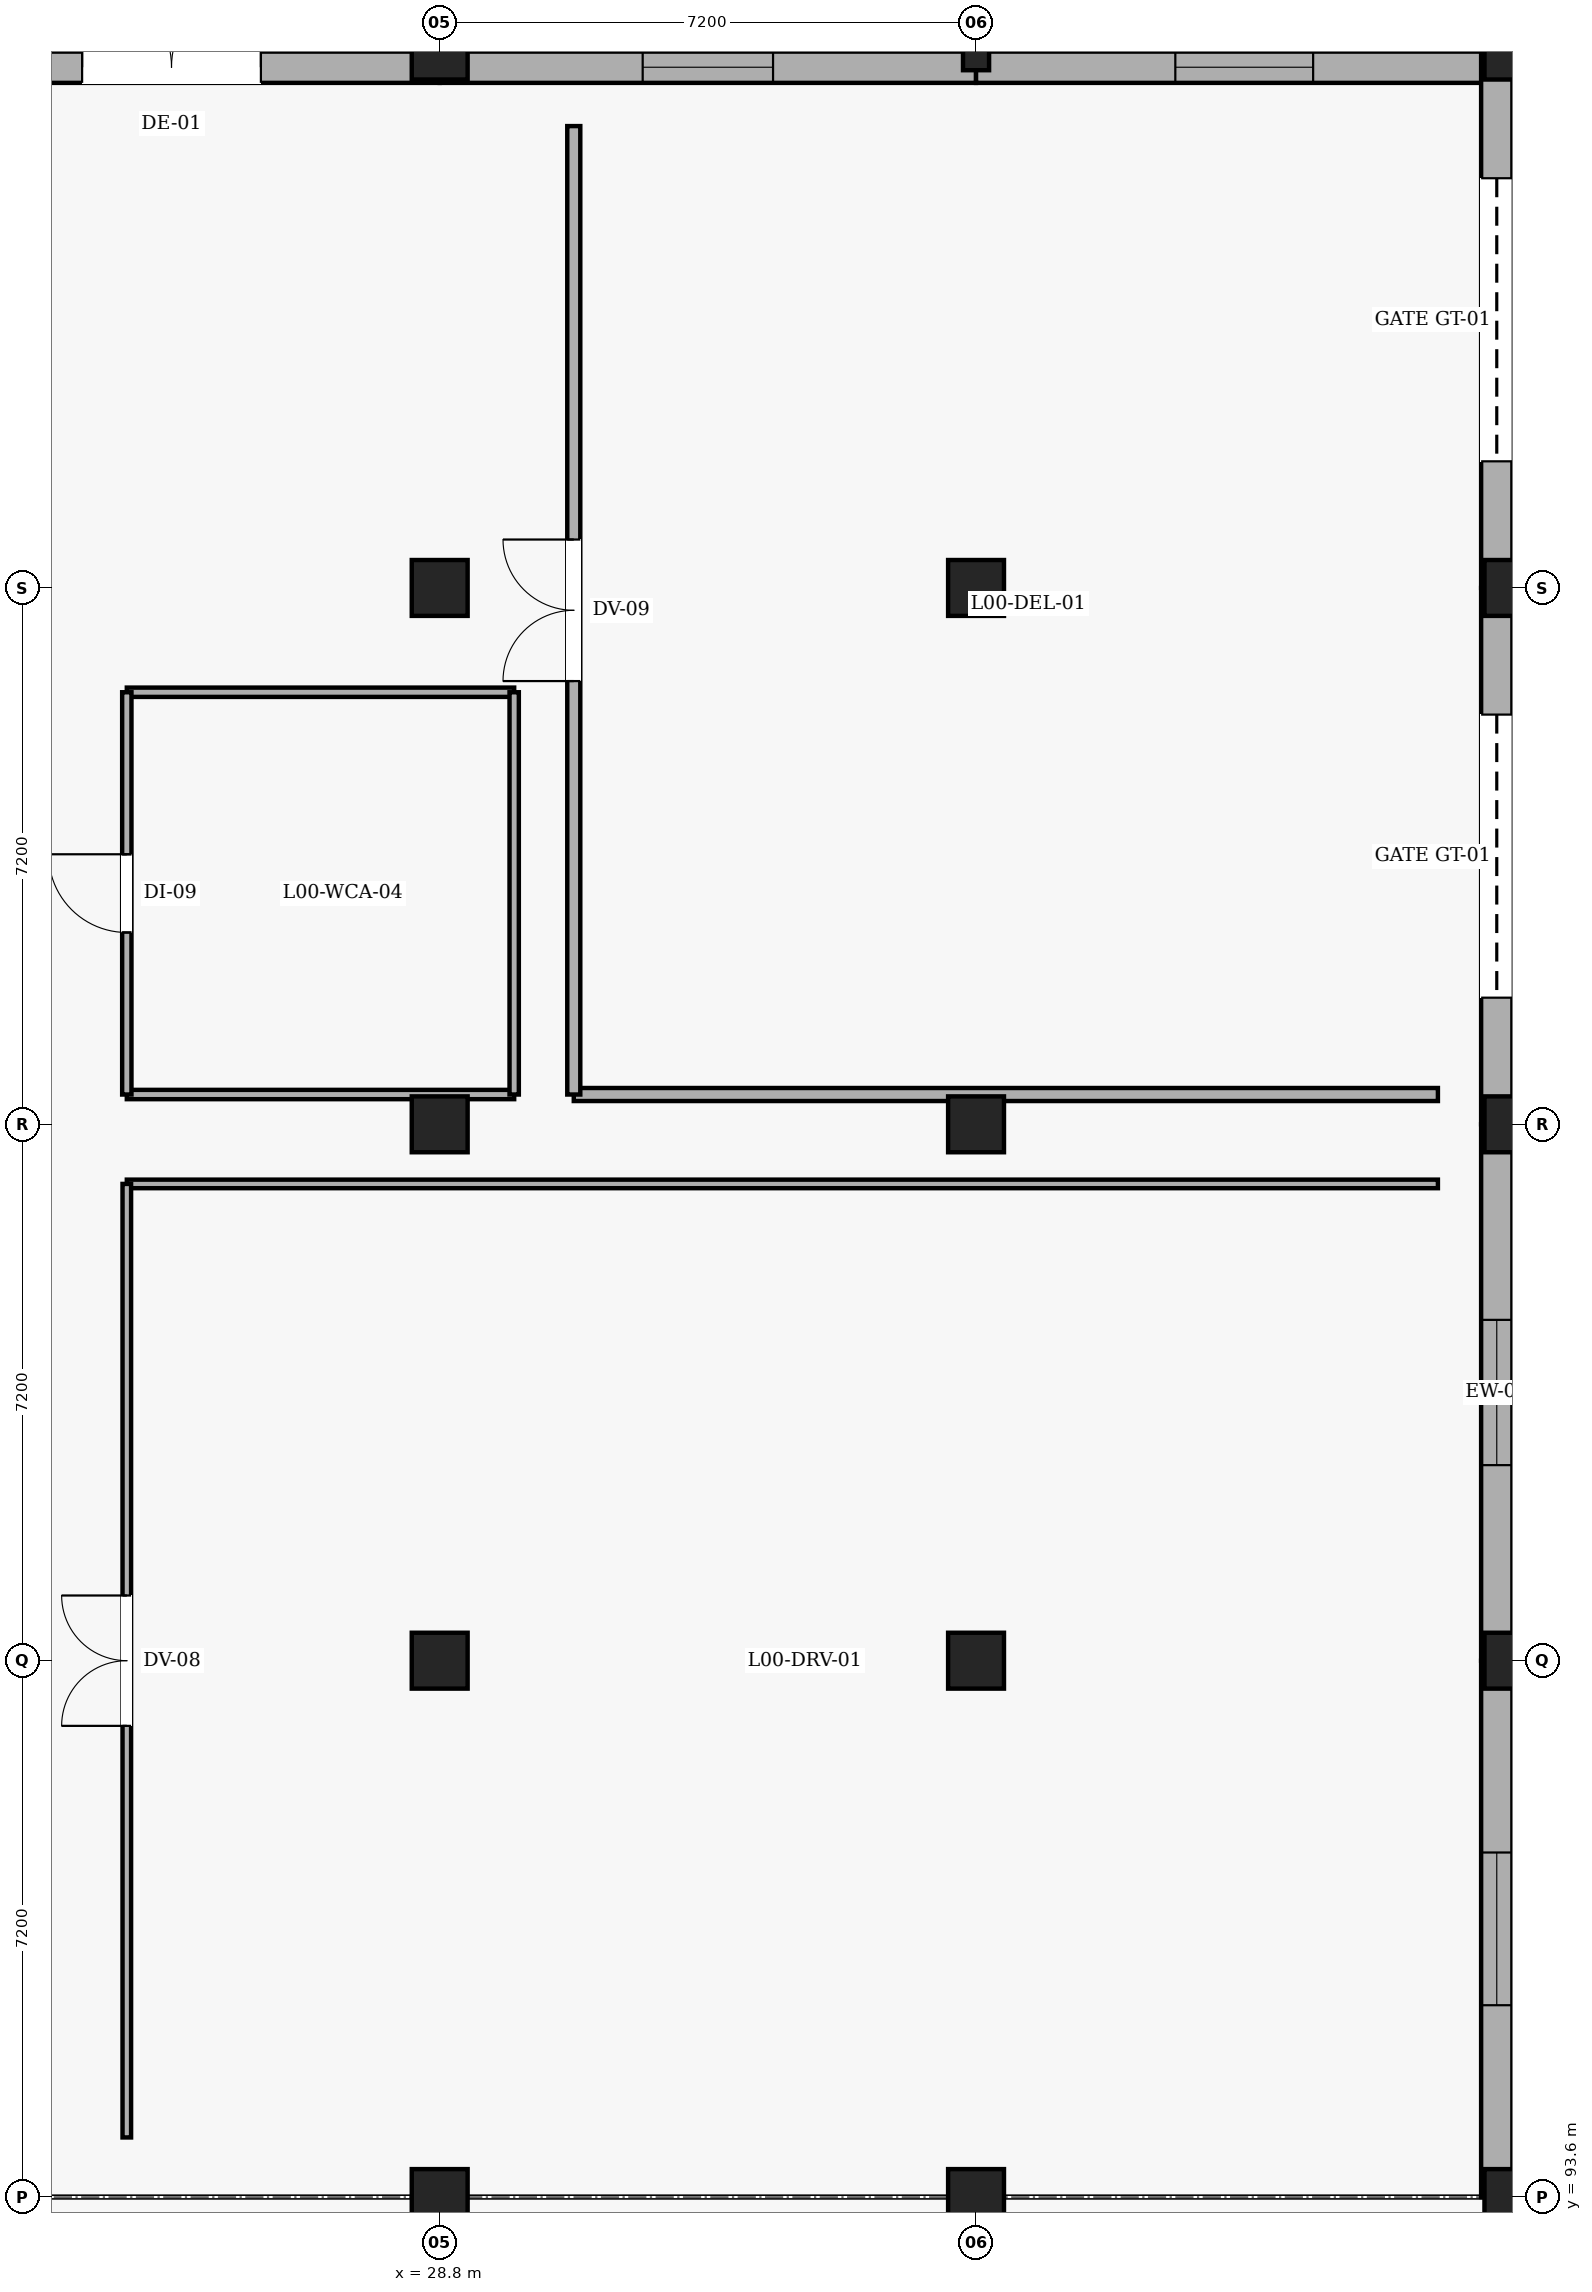
"""IFC4 building model, lengths in metres.
Left out: names, types, materials, properties, quantities, classifications, styles, units other than length and angle.
Written with IfcOpenShell. Run it as: python <this file> out.ifc"""

import sys

from ifc_helpers import new_model, si_unit, direction, frame, frame_2d, origin, origin_2d, place, context, subcontext, project, spatial, rectangle, extrude, element, fill, save


model = new_model("IFC4")
c1 = context("Model", 3, precision=1e-05, world=origin(), true_north=direction((0.0, 1.0)))
c2 = subcontext(c1, "Body", "Model", "MODEL_VIEW")
j1 = project(units=[si_unit("LENGTHUNIT", "METRE"), si_unit("PLANEANGLEUNIT", "RADIAN")], contexts=[c1])
p1 = place(None, origin())
s1 = spatial("IfcSite", under=j1, at=p1, CompositionType="ELEMENT")
p2 = place(p1, origin())
s2 = spatial("IfcBuilding", under=s1, at=p2, CompositionType="ELEMENT")
p3 = place(p2, origin())
s3 = spatial("IfcBuildingStorey", under=s2, at=p3, CompositionType="ELEMENT", Elevation=0.0)
for number, where, z_axis, x_axis in (
    (1, (28.8, 93.6, 0.0), (0.0, 0.0, 1.0), (1.0, 0.0, 0.0)),
    (2, (28.8, 100.8, 0.0), (0.0, 0.0, 1.0), (1.0, 0.0, 0.0)),
    (3, (28.8, 108.0, 0.0), (0.0, 0.0, 1.0), (1.0, 0.0, 0.0)),
    (4, (28.8, 115.2, 0.0), (0.0, 0.0, 1.0), (1.0, 0.0, 0.0)),
    (5, (28.8, 122.4, 0.0), (0.0, 0.0, 1.0), (1.0, 0.0, 0.0)),
    (6, (36.0, 93.6, 0.0), (0.0, 0.0, 1.0), (1.0, 0.0, 0.0)),
    (7, (36.0, 100.8, 0.0), (0.0, 0.0, 1.0), (1.0, 0.0, 0.0)),
    (8, (36.0, 108.0, 0.0), (0.0, 0.0, 1.0), (1.0, 0.0, 0.0)),
    (9, (36.0, 115.2, 0.0), (0.0, 0.0, 1.0), (1.0, 0.0, 0.0)),
):
    element("IfcColumn", number, at=place(p3, frame(where, z_axis=z_axis, x_axis=x_axis)), inside=s3, PredefinedType="COLUMN", context=c2, shape_type="SweptSolid", body=[
        extrude(rectangle(XDim=0.75, YDim=0.75, at=origin_2d()), origin(), (0.0, 0.0, 1.0), 5.08),
    ])
p4 = place(p3, frame((36.0, 122.4, 0.0), z_axis=(0.0, 0.0, 1.0), x_axis=(1.0, 0.0, 0.0)))
e10 = element("IfcColumn", 10, at=p4, inside=s3, PredefinedType="PILASTER", context=c2, shape_type="SweptSolid", body=[
    extrude(rectangle(XDim=0.35, YDim=0.5, at=origin_2d()), origin(), (0.0, 0.0, 1.0), 5.08),
])
for number, where, z_axis, x_axis in (
    (11, (43.2, 93.6, 0.0), (0.0, 0.0, 1.0), (0.0, 1.0, 0.0)),
    (12, (43.2, 100.8, 0.0), (0.0, 0.0, 1.0), (1.0, 0.0, 0.0)),
    (13, (43.2, 108.0, 0.0), (0.0, 0.0, 1.0), (1.0, 0.0, 0.0)),
    (14, (43.2, 115.2, 0.0), (0.0, 0.0, 1.0), (1.0, 0.0, 0.0)),
    (15, (43.2, 122.4, 0.0), (0.0, 0.0, 1.0), (1.0, 0.0, 0.0)),
):
    element("IfcColumn", number, at=place(p3, frame(where, z_axis=z_axis, x_axis=x_axis)), inside=s3, PredefinedType="COLUMN", context=c2, shape_type="SweptSolid", body=[
        extrude(rectangle(XDim=0.75, YDim=0.75, at=origin_2d()), origin(), (0.0, 0.0, 1.0), 5.08),
    ])
p5 = place(p3, frame((21.6, 122.19, 0.0), z_axis=(0.0, 0.0, 1.0), x_axis=(1.0, 0.0, 0.0)))
e16 = element("IfcWall", 16, at=p5, inside=s3, PredefinedType="SOLIDWALL", context=c2, shape_type="SweptSolid", body=[
    extrude(rectangle(XDim=7.2, YDim=0.42, at=frame_2d((3.6, 0.0))), origin(), (0.0, 0.0, 1.0), 4.78),
])
p6 = place(p5, frame((2.4, 0.0, 0.0)))
e17 = element("IfcOpeningElement", 17, at=p6, cuts=e16, PredefinedType="OPENING", context=c2, shape_type="SweptSolid", body=[
    extrude(rectangle(XDim=2.4, YDim=2.5, at=frame_2d((1.2, 1.25))), frame((0.0, 0.22, 0.0), z_axis=(0.0, -1.0, 0.0), x_axis=(1.0, 0.0, 0.0)), (0.0, 0.0, 1.0), 0.44),
])
p7 = place(p3, frame((28.8, 122.19, 0.0), z_axis=(0.0, 0.0, 1.0), x_axis=(1.0, 0.0, 0.0)))
e18 = element("IfcWall", 18, at=p7, inside=s3, PredefinedType="SOLIDWALL", context=c2, shape_type="SweptSolid", body=[
    extrude(rectangle(XDim=7.2, YDim=0.42, at=frame_2d((3.6, 0.0))), origin(), (0.0, 0.0, 1.0), 4.78),
])
p8 = place(p7, frame((2.725, 0.0, 0.9)))
e19 = element("IfcOpeningElement", 19, at=p8, cuts=e18, PredefinedType="OPENING", context=c2, shape_type="SweptSolid", body=[
    extrude(rectangle(XDim=1.75, YDim=1.45, at=frame_2d((0.875, 0.725))), frame((0.0, 0.22, 0.0), z_axis=(0.0, -1.0, 0.0), x_axis=(1.0, 0.0, 0.0)), (0.0, 0.0, 1.0), 0.44),
])
p9 = place(p3, frame((36.0, 122.19, 0.0), z_axis=(0.0, 0.0, 1.0), x_axis=(1.0, 0.0, 0.0)))
e20 = element("IfcWall", 20, at=p9, inside=s3, PredefinedType="SOLIDWALL", context=c2, shape_type="SweptSolid", body=[
    extrude(rectangle(XDim=7.2, YDim=0.42, at=frame_2d((3.6, 0.0))), origin(), (0.0, 0.0, 1.0), 4.78),
])
p10 = place(p9, frame((2.675, 0.0, 0.9)))
e21 = element("IfcOpeningElement", 21, at=p10, cuts=e20, PredefinedType="OPENING", context=c2, shape_type="SweptSolid", body=[
    extrude(rectangle(XDim=1.85, YDim=1.5, at=frame_2d((0.925, 0.75))), frame((0.0, 0.22, 0.0), z_axis=(0.0, -1.0, 0.0), x_axis=(1.0, 0.0, 0.0)), (0.0, 0.0, 1.0), 0.44),
])
p11 = place(p3, frame((42.99, 122.4, 0.0), z_axis=(0.0, 0.0, 1.0), x_axis=(0.0, -1.0, 0.0)))
e22 = element("IfcWall", 22, at=p11, inside=s3, PredefinedType="SOLIDWALL", context=c2, shape_type="SweptSolid", body=[
    extrude(rectangle(XDim=7.2, YDim=0.42, at=frame_2d((3.6, 0.0))), origin(), (0.0, 0.0, 1.0), 4.75),
])
p12 = place(p11, frame((1.7, 0.0, 0.0)))
e23 = element("IfcOpeningElement", 23, at=p12, cuts=e22, PredefinedType="OPENING", context=c2, shape_type="SweptSolid", body=[
    extrude(rectangle(XDim=3.8, YDim=2.7, at=frame_2d((1.9, 1.35))), frame((0.0, 0.22, 0.0), z_axis=(0.0, -1.0, 0.0), x_axis=(1.0, 0.0, 0.0)), (0.0, 0.0, 1.0), 0.44),
])
p13 = place(p3, frame((42.99, 115.2, 0.0), z_axis=(0.0, 0.0, 1.0), x_axis=(0.0, -1.0, 0.0)))
e24 = element("IfcWall", 24, at=p13, inside=s3, PredefinedType="SOLIDWALL", context=c2, shape_type="SweptSolid", body=[
    extrude(rectangle(XDim=7.2, YDim=0.42, at=frame_2d((3.6, 0.0))), origin(), (0.0, 0.0, 1.0), 4.75),
])
p14 = place(p13, frame((1.7, 0.0, 0.0)))
e25 = element("IfcOpeningElement", 25, at=p14, cuts=e24, PredefinedType="OPENING", context=c2, shape_type="SweptSolid", body=[
    extrude(rectangle(XDim=3.8, YDim=2.7, at=frame_2d((1.9, 1.35))), frame((0.0, 0.22, 0.0), z_axis=(0.0, -1.0, 0.0), x_axis=(1.0, 0.0, 0.0)), (0.0, 0.0, 1.0), 0.44),
])
p15 = place(p3, frame((42.99, 108.0, 0.0), z_axis=(0.0, 0.0, 1.0), x_axis=(0.0, -1.0, 0.0)))
e26 = element("IfcWall", 26, at=p15, inside=s3, PredefinedType="SOLIDWALL", context=c2, shape_type="SweptSolid", body=[
    extrude(rectangle(XDim=7.2, YDim=0.42, at=frame_2d((3.6, 0.0))), origin(), (0.0, 0.0, 1.0), 4.75),
])
p16 = place(p15, frame((2.625, 0.0, 0.9)))
e27 = element("IfcOpeningElement", 27, at=p16, cuts=e26, PredefinedType="OPENING", context=c2, shape_type="SweptSolid", body=[
    extrude(rectangle(XDim=1.95, YDim=1.55, at=frame_2d((0.975, 0.775))), frame((0.0, 0.22, 0.0), z_axis=(0.0, -1.0, 0.0), x_axis=(1.0, 0.0, 0.0)), (0.0, 0.0, 1.0), 0.44),
])
p17 = place(p3, frame((42.99, 100.8, 0.0), z_axis=(0.0, 0.0, 1.0), x_axis=(0.0, -1.0, 0.0)))
e28 = element("IfcWall", 28, at=p17, inside=s3, PredefinedType="SOLIDWALL", context=c2, shape_type="SweptSolid", body=[
    extrude(rectangle(XDim=7.2, YDim=0.42, at=frame_2d((3.6, 0.0))), origin(), (0.0, 0.0, 1.0), 4.75),
])
p18 = place(p17, frame((2.575, 0.0, 0.9)))
e29 = element("IfcOpeningElement", 29, at=p18, cuts=e28, PredefinedType="OPENING", context=c2, shape_type="SweptSolid", body=[
    extrude(rectangle(XDim=2.05, YDim=1.6, at=frame_2d((1.025, 0.8))), frame((0.0, 0.22, 0.0), z_axis=(0.0, -1.0, 0.0), x_axis=(1.0, 0.0, 0.0)), (0.0, 0.0, 1.0), 0.44),
])
p19 = place(p3, frame((43.03, 93.6, 0.0), z_axis=(0.0, 0.0, 1.0), x_axis=(0.0, -1.0, 0.0)))
e30 = element("IfcWall", 30, at=p19, inside=s3, PredefinedType="SOLIDWALL", context=c2, shape_type="SweptSolid", body=[
    extrude(rectangle(XDim=7.2, YDim=0.34, at=frame_2d((3.6, 0.0))), origin(), (0.0, 0.0, 1.0), 4.79),
])
p20 = place(p19, frame((2.525, 0.0, 0.9)))
e31 = element("IfcOpeningElement", 31, at=p20, cuts=e30, PredefinedType="OPENING", context=c2, shape_type="SweptSolid", body=[
    extrude(rectangle(XDim=2.15, YDim=1.65, at=frame_2d((1.075, 0.825))), frame((0.0, 0.18, 0.0), z_axis=(0.0, -1.0, 0.0), x_axis=(1.0, 0.0, 0.0)), (0.0, 0.0, 1.0), 0.36),
])
p21 = place(p3, frame((24.6, 107.2, 0.0), z_axis=(0.0, 0.0, 1.0), x_axis=(1.0, 0.0, 0.0)))
e32 = element("IfcWall", 32, at=p21, inside=s3, PredefinedType="PARTITIONING", context=c2, shape_type="SweptSolid", body=[
    extrude(rectangle(XDim=17.6, YDim=0.115, at=frame_2d((8.8, 0.0))), origin(), (0.0, 0.0, 1.0), 4.63),
])
p22 = place(p3, frame((24.6, 94.4, 0.0), z_axis=(0.0, 0.0, 1.0), x_axis=(0.0, 1.0, 0.0)))
e33 = element("IfcWall", 33, at=p22, inside=s3, PredefinedType="PARTITIONING", context=c2, shape_type="SweptSolid", body=[
    extrude(rectangle(XDim=12.8, YDim=0.115, at=frame_2d((6.4, 0.0))), origin(), (0.0, 0.0, 1.0), 4.63),
])
p23 = place(p22, frame((5.525, 0.0, 0.0)))
e34 = element("IfcOpeningElement", 34, at=p23, cuts=e33, PredefinedType="OPENING", context=c2, shape_type="SweptSolid", body=[
    extrude(rectangle(XDim=1.75, YDim=2.25, at=frame_2d((0.875, 1.125))), frame((0.0, 0.067, 0.0), z_axis=(0.0, -1.0, 0.0), x_axis=(1.0, 0.0, 0.0)), (0.0, 0.0, 1.0), 0.135),
])
for number, where, z_axis, x_axis in (
    (35, (24.6, 113.8, 0.0), (0.0, 0.0, 1.0), (1.0, 0.0, 0.0)),
    (36, (29.8, 108.4, 0.0), (0.0, 0.0, 1.0), (-1.0, 0.0, 0.0)),
):
    element("IfcWall", number, at=place(p3, frame(where, z_axis=z_axis, x_axis=x_axis)), inside=s3, PredefinedType="PARTITIONING", context=c2, shape_type="SweptSolid", body=[
        extrude(rectangle(XDim=5.2, YDim=0.125, at=frame_2d((2.6, 0.0))), origin(), (0.0, 0.0, 1.0), 4.63),
    ])
p24 = place(p3, frame((29.8, 113.8, 0.0), z_axis=(0.0, 0.0, 1.0), x_axis=(0.0, -1.0, 0.0)))
e37 = element("IfcWall", 37, at=p24, inside=s3, PredefinedType="PARTITIONING", context=c2, shape_type="SweptSolid", body=[
    extrude(rectangle(XDim=5.4, YDim=0.125, at=frame_2d((2.7, 0.0))), origin(), (0.0, 0.0, 1.0), 4.75),
])
p25 = place(p3, frame((24.6, 108.4, 0.0), z_axis=(0.0, 0.0, 1.0), x_axis=(0.0, 1.0, 0.0)))
e38 = element("IfcWall", 38, at=p25, inside=s3, PredefinedType="PARTITIONING", context=c2, shape_type="SweptSolid", body=[
    extrude(rectangle(XDim=5.4, YDim=0.125, at=frame_2d((2.7, 0.0))), origin(), (0.0, 0.0, 1.0), 4.75),
])
p26 = place(p25, frame((2.175, 0.0, 0.0)))
e39 = element("IfcOpeningElement", 39, at=p26, cuts=e38, PredefinedType="OPENING", context=c2, shape_type="SweptSolid", body=[
    extrude(rectangle(XDim=1.05, YDim=2.1, at=frame_2d((0.525, 1.05))), frame((0.0, 0.073, 0.0), z_axis=(0.0, -1.0, 0.0), x_axis=(1.0, 0.0, 0.0)), (0.0, 0.0, 1.0), 0.145),
])
p27 = place(p3, frame((42.2, 108.4, 0.0), z_axis=(0.0, 0.0, 1.0), x_axis=(-1.0, 0.0, 0.0)))
e40 = element("IfcWall", 40, at=p27, inside=s3, PredefinedType="PARTITIONING", context=c2, shape_type="SweptSolid", body=[
    extrude(rectangle(XDim=11.6, YDim=0.175, at=frame_2d((5.8, 0.0))), origin(), (0.0, 0.0, 1.0), 4.63),
])
p28 = place(p3, frame((30.6, 108.4, 0.0), z_axis=(0.0, 0.0, 1.0), x_axis=(0.0, 1.0, 0.0)))
e41 = element("IfcWall", 41, at=p28, inside=s3, PredefinedType="PARTITIONING", context=c2, shape_type="SweptSolid", body=[
    extrude(rectangle(XDim=13.0, YDim=0.175, at=frame_2d((6.5, 0.0))), origin(), (0.0, 0.0, 1.0), 4.63),
])
p29 = place(p28, frame((5.55, 0.0, 0.0)))
e42 = element("IfcOpeningElement", 42, at=p29, cuts=e41, PredefinedType="OPENING", context=c2, shape_type="SweptSolid", body=[
    extrude(rectangle(XDim=1.9, YDim=2.3, at=frame_2d((0.95, 1.15))), frame((0.0, 0.097, 0.0), z_axis=(0.0, -1.0, 0.0), x_axis=(1.0, 0.0, 0.0)), (0.0, 0.0, 1.0), 0.195),
])
p30 = place(p6, origin())
e43 = element("IfcDoor", 43, at=p30, inside=s3, OperationType="DOUBLE_DOOR_SINGLE_SWING", PredefinedType="DOOR", context=c2, shape_type="SweptSolid", body=[
    extrude(rectangle(XDim=2.4, YDim=2.5, at=frame_2d((1.2, 1.25))), frame((0.0, 0.025, 0.0), z_axis=(0.0, -1.0, 0.0), x_axis=(1.0, 0.0, 0.0)), (0.0, 0.0, 1.0), 0.05),
])
fill(e17, e43)
p31 = place(p8, origin())
e44 = element("IfcWindow", 44, at=p31, inside=s3, PartitioningType="SINGLE_PANEL", PredefinedType="WINDOW", context=c2, shape_type="SweptSolid", body=[
    extrude(rectangle(XDim=1.75, YDim=1.45, at=frame_2d((0.875, 0.725))), frame((0.0, 0.03, 0.0), z_axis=(0.0, -1.0, 0.0), x_axis=(1.0, 0.0, 0.0)), (0.0, 0.0, 1.0), 0.06),
])
fill(e19, e44)
p32 = place(p10, origin())
e45 = element("IfcWindow", 45, at=p32, inside=s3, PartitioningType="SINGLE_PANEL", PredefinedType="WINDOW", context=c2, shape_type="SweptSolid", body=[
    extrude(rectangle(XDim=1.85, YDim=1.5, at=frame_2d((0.925, 0.75))), frame((0.0, 0.03, 0.0), z_axis=(0.0, -1.0, 0.0), x_axis=(1.0, 0.0, 0.0)), (0.0, 0.0, 1.0), 0.06),
])
fill(e21, e45)
p33 = place(p12, origin())
e46 = element("IfcDoor", 46, at=p33, inside=s3, OperationType="ROLLINGUP", PredefinedType="GATE", context=c2, shape_type="SweptSolid", body=[
    extrude(rectangle(XDim=3.8, YDim=2.7, at=frame_2d((1.9, 1.35))), frame((0.0, 0.025, 0.0), z_axis=(0.0, -1.0, 0.0), x_axis=(1.0, 0.0, 0.0)), (0.0, 0.0, 1.0), 0.05),
])
fill(e23, e46)
p34 = place(p14, origin())
e47 = element("IfcDoor", 47, at=p34, inside=s3, OperationType="ROLLINGUP", PredefinedType="GATE", context=c2, shape_type="SweptSolid", body=[
    extrude(rectangle(XDim=3.8, YDim=2.7, at=frame_2d((1.9, 1.35))), frame((0.0, 0.025, 0.0), z_axis=(0.0, -1.0, 0.0), x_axis=(1.0, 0.0, 0.0)), (0.0, 0.0, 1.0), 0.05),
])
fill(e25, e47)
p35 = place(p16, origin())
e48 = element("IfcWindow", 48, at=p35, inside=s3, PartitioningType="SINGLE_PANEL", PredefinedType="WINDOW", context=c2, shape_type="SweptSolid", body=[
    extrude(rectangle(XDim=1.95, YDim=1.55, at=frame_2d((0.975, 0.775))), frame((0.0, 0.03, 0.0), z_axis=(0.0, -1.0, 0.0), x_axis=(1.0, 0.0, 0.0)), (0.0, 0.0, 1.0), 0.06),
])
fill(e27, e48)
p36 = place(p18, origin())
e49 = element("IfcWindow", 49, at=p36, inside=s3, PartitioningType="SINGLE_PANEL", PredefinedType="WINDOW", context=c2, shape_type="SweptSolid", body=[
    extrude(rectangle(XDim=2.05, YDim=1.6, at=frame_2d((1.025, 0.8))), frame((0.0, 0.03, 0.0), z_axis=(0.0, -1.0, 0.0), x_axis=(1.0, 0.0, 0.0)), (0.0, 0.0, 1.0), 0.06),
])
fill(e29, e49)
p37 = place(p23, origin())
e50 = element("IfcDoor", 50, at=p37, inside=s3, OperationType="DOUBLE_DOOR_SINGLE_SWING", PredefinedType="DOOR", context=c2, shape_type="SweptSolid", body=[
    extrude(rectangle(XDim=1.75, YDim=2.25, at=frame_2d((0.875, 1.125))), frame((0.0, 0.025, 0.0), z_axis=(0.0, -1.0, 0.0), x_axis=(1.0, 0.0, 0.0)), (0.0, 0.0, 1.0), 0.05),
])
fill(e34, e50)
p38 = place(p26, origin())
e51 = element("IfcDoor", 51, at=p38, inside=s3, OperationType="SINGLE_SWING_RIGHT", PredefinedType="DOOR", context=c2, shape_type="SweptSolid", body=[
    extrude(rectangle(XDim=1.05, YDim=2.1, at=frame_2d((0.525, 1.05))), frame((0.0, 0.025, 0.0), z_axis=(0.0, -1.0, 0.0), x_axis=(1.0, 0.0, 0.0)), (0.0, 0.0, 1.0), 0.05),
])
fill(e39, e51)
p39 = place(p29, origin())
e52 = element("IfcDoor", 52, at=p39, inside=s3, OperationType="DOUBLE_DOOR_SINGLE_SWING", PredefinedType="DOOR", context=c2, shape_type="SweptSolid", body=[
    extrude(rectangle(XDim=1.9, YDim=2.3, at=frame_2d((0.95, 1.15))), frame((0.0, 0.025, 0.0), z_axis=(0.0, -1.0, 0.0), x_axis=(1.0, 0.0, 0.0)), (0.0, 0.0, 1.0), 0.05),
])
fill(e42, e52)
save(model, sys.argv[1])
